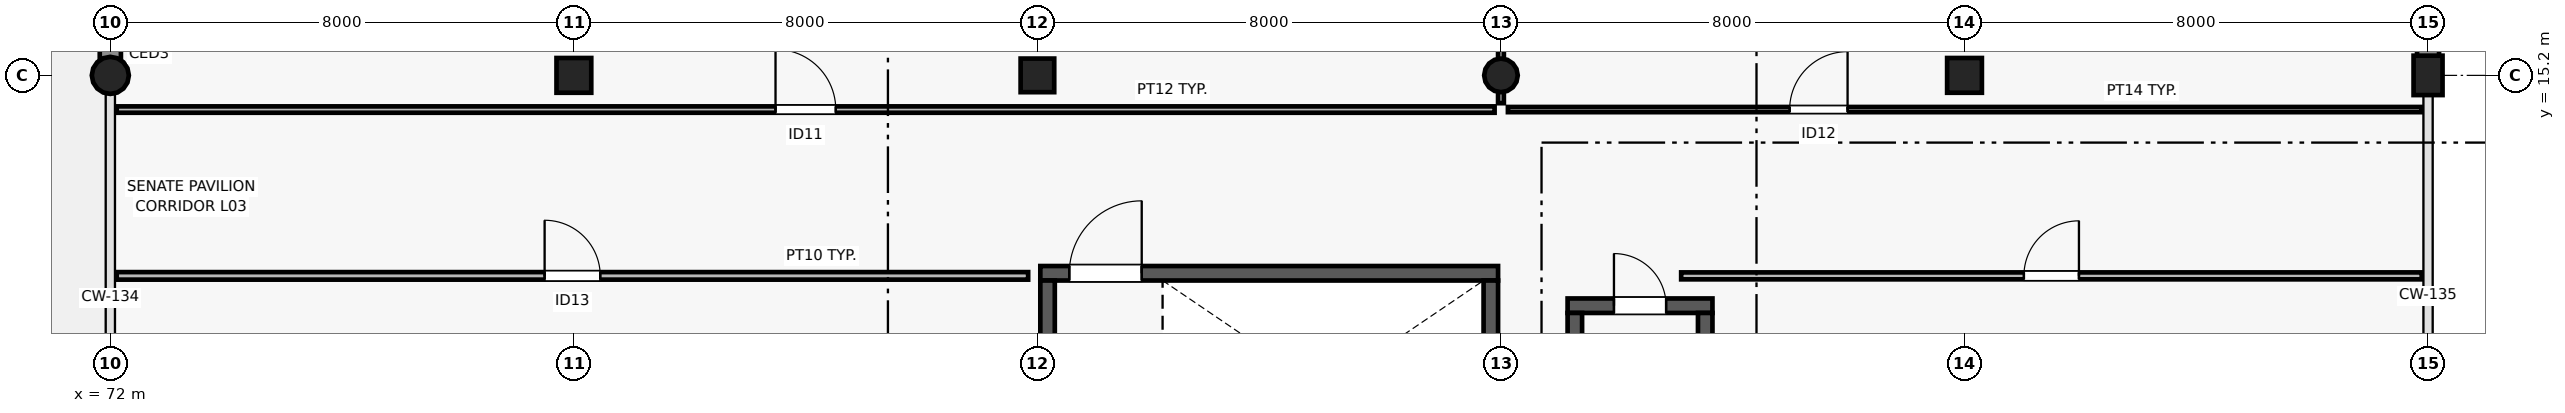
"""IFC4 building model, lengths in metres.
Left out: names, types, materials, properties, quantities, classifications, styles, units other than length and angle.
Written with IfcOpenShell. Run it as: python <this file> out.ifc"""

import sys

from ifc_helpers import new_model, si_unit, direction, frame, frame_2d, origin, origin_2d, place, context, subcontext, project, spatial, rectangle, circle, extrude, element, fill, save


model = new_model("IFC4")
c1 = context("Model", 3, precision=1e-05, world=origin(), true_north=direction((0.0, 1.0)))
c2 = subcontext(c1, "Body", "Model", "MODEL_VIEW")
j1 = project(units=[si_unit("LENGTHUNIT", "METRE"), si_unit("PLANEANGLEUNIT", "RADIAN")], contexts=[c1])
p1 = place(None, origin())
s1 = spatial("IfcSite", under=j1, at=p1, CompositionType="ELEMENT")
p2 = place(p1, origin())
s2 = spatial("IfcBuilding", under=s1, at=p2, CompositionType="ELEMENT")
p3 = place(p2, frame((0.0, 0.0, 13.2)))
s3 = spatial("IfcBuildingStorey", under=s2, at=p3, CompositionType="ELEMENT", Elevation=13.2)
p4 = place(p3, frame((72.0, 15.2, 0.0), z_axis=(0.0, 0.0, 1.0), x_axis=(1.0, 0.0, 0.0)))
e1 = element("IfcColumn", 1, at=p4, inside=s3, PredefinedType="COLUMN", context=c2, shape_type="SweptSolid", body=[
    extrude(circle(Radius=0.32, at=origin_2d()), origin(), (0.0, 0.0, 1.0), 4.2),
])
p5 = place(p3, frame((80.0, 15.2, 0.0), z_axis=(0.0, 0.0, 1.0), x_axis=(1.0, 0.0, 0.0)))
e2 = element("IfcColumn", 2, at=p5, inside=s3, PredefinedType="COLUMN", context=c2, shape_type="SweptSolid", body=[
    extrude(rectangle(XDim=0.6, YDim=0.6, at=origin_2d()), origin(), (0.0, 0.0, 1.0), 4.2),
])
p6 = place(p3, frame((88.0, 15.2, 0.0), z_axis=(0.0, 0.0, 1.0), x_axis=(1.0, 0.0, 0.0)))
e3 = element("IfcColumn", 3, at=p6, inside=s3, PredefinedType="COLUMN", context=c2, shape_type="SweptSolid", body=[
    extrude(rectangle(XDim=0.58, YDim=0.58, at=origin_2d()), origin(), (0.0, 0.0, 1.0), 4.2),
])
p7 = place(p3, frame((96.0, 15.2, 0.0), z_axis=(0.0, 0.0, 1.0), x_axis=(1.0, 0.0, 0.0)))
e4 = element("IfcColumn", 4, at=p7, inside=s3, PredefinedType="COLUMN", context=c2, shape_type="SweptSolid", body=[
    extrude(circle(Radius=0.29, at=origin_2d()), origin(), (0.0, 0.0, 1.0), 4.2),
])
p8 = place(p3, frame((104.0, 15.2, 0.0), z_axis=(0.0, 0.0, 1.0), x_axis=(1.0, 0.0, 0.0)))
e5 = element("IfcColumn", 5, at=p8, inside=s3, PredefinedType="COLUMN", context=c2, shape_type="SweptSolid", body=[
    extrude(rectangle(XDim=0.6, YDim=0.6, at=origin_2d()), origin(), (0.0, 0.0, 1.0), 4.2),
])
p9 = place(p3, frame((112.0, 15.2, 0.0), z_axis=(0.0, 0.0, 1.0), x_axis=(1.0, 0.0, 0.0)))
e6 = element("IfcColumn", 6, at=p9, inside=s3, PredefinedType="COLUMN", context=c2, shape_type="SweptSolid", body=[
    extrude(rectangle(XDim=0.68, YDim=0.5, at=origin_2d()), origin(), (0.0, 0.0, 1.0), 4.2),
])
p10 = place(p3, frame((72.0, 22.555, 0.0), z_axis=(0.0, 0.0, 1.0), x_axis=(0.0, -1.0, 0.0)))
e7 = element("IfcWall", 7, at=p10, inside=s3, PredefinedType="SOLIDWALL", context=c2, shape_type="SweptSolid", body=[
    extrude(rectangle(XDim=7.086, YDim=0.365, at=frame_2d((3.543, 0.0))), origin(), (0.0, 0.0, 1.0), 3.5),
])
p11 = place(p10, frame((1.669, 0.0, 0.9)))
e8 = element("IfcOpeningElement", 8, at=p11, cuts=e7, PredefinedType="OPENING", context=c2, shape_type="SweptSolid", body=[
    extrude(rectangle(XDim=1.2, YDim=1.5, at=frame_2d((0.6, 0.75))), frame((0.0, 0.192, 0.0), z_axis=(0.0, -1.0, 0.0), x_axis=(1.0, 0.0, 0.0)), (0.0, 0.0, 1.0), 0.385),
])
p12 = place(p10, frame((4.217, 0.0, 0.9)))
e9 = element("IfcOpeningElement", 9, at=p12, cuts=e7, PredefinedType="OPENING", context=c2, shape_type="SweptSolid", body=[
    extrude(rectangle(XDim=1.2, YDim=1.5, at=frame_2d((0.6, 0.75))), frame((0.0, 0.192, 0.0), z_axis=(0.0, -1.0, 0.0), x_axis=(1.0, 0.0, 0.0)), (0.0, 0.0, 1.0), 0.385),
])
p13 = place(p3, frame((112.0, 15.445, 0.0), z_axis=(0.0, 0.0, 1.0), x_axis=(0.0, 1.0, 0.0)))
e10 = element("IfcWall", 10, at=p13, inside=s3, PredefinedType="SOLIDWALL", context=c2, shape_type="SweptSolid", body=[
    extrude(rectangle(XDim=7.086, YDim=0.38, at=frame_2d((3.543, 0.0))), origin(), (0.0, 0.0, 1.0), 3.38),
])
p14 = place(p13, frame((0.869, 0.0, 0.9)))
e11 = element("IfcOpeningElement", 11, at=p14, cuts=e10, PredefinedType="OPENING", context=c2, shape_type="SweptSolid", body=[
    extrude(rectangle(XDim=2.4, YDim=1.8, at=frame_2d((1.2, 0.9))), frame((0.0, 0.2, 0.0), z_axis=(0.0, -1.0, 0.0), x_axis=(1.0, 0.0, 0.0)), (0.0, 0.0, 1.0), 0.4),
])
p15 = place(p13, frame((3.817, 0.0, 0.9)))
e12 = element("IfcOpeningElement", 12, at=p15, cuts=e10, PredefinedType="OPENING", context=c2, shape_type="SweptSolid", body=[
    extrude(rectangle(XDim=2.4, YDim=1.8, at=frame_2d((1.2, 0.9))), frame((0.0, 0.2, 0.0), z_axis=(0.0, -1.0, 0.0), x_axis=(1.0, 0.0, 0.0)), (0.0, 0.0, 1.0), 0.4),
])
p16 = place(p3, frame((88.05, 11.785, 0.0), z_axis=(0.0, 0.0, 1.0), x_axis=(1.0, 0.0, 0.0)))
e13 = element("IfcWall", 13, at=p16, inside=s3, PredefinedType="SHEAR", context=c2, shape_type="SweptSolid", body=[
    extrude(rectangle(XDim=7.9, YDim=0.25, at=frame_2d((3.95, 0.0))), origin(), (0.0, 0.0, 1.0), 3.92),
])
p17 = place(p16, frame((0.5, 0.0, 0.0)))
e14 = element("IfcOpeningElement", 14, at=p17, cuts=e13, PredefinedType="OPENING", context=c2, shape_type="SweptSolid", body=[
    extrude(rectangle(XDim=1.25, YDim=2.2, at=frame_2d((0.625, 1.1))), frame((0.0, 0.135, 0.0), z_axis=(0.0, -1.0, 0.0), x_axis=(1.0, 0.0, 0.0)), (0.0, 0.0, 1.0), 0.27),
])
for number, where, z_axis, x_axis in (
    (15, (88.175, 7.9, 0.0), (0.0, 0.0, 1.0), (0.0, 1.0, 0.0)),
    (16, (95.825, 7.9, 0.0), (0.0, 0.0, 1.0), (0.0, 1.0, 0.0)),
):
    element("IfcWall", number, at=place(p3, frame(where, z_axis=z_axis, x_axis=x_axis)), inside=s3, PredefinedType="SHEAR", context=c2, shape_type="SweptSolid", body=[
        extrude(rectangle(XDim=3.76, YDim=0.25, at=frame_2d((1.88, 0.0))), origin(), (0.0, 0.0, 1.0), 3.92),
    ])
p18 = place(p3, frame((97.15, 11.225, 0.0), z_axis=(0.0, 0.0, 1.0), x_axis=(1.0, 0.0, 0.0)))
e17 = element("IfcWall", 17, at=p18, inside=s3, PredefinedType="SHEAR", context=c2, shape_type="SweptSolid", body=[
    extrude(rectangle(XDim=2.5, YDim=0.25, at=frame_2d((1.25, 0.0))), origin(), (0.0, 0.0, 1.0), 3.92),
])
p19 = place(p18, frame((0.8, 0.0, 0.0)))
e18 = element("IfcOpeningElement", 18, at=p19, cuts=e17, PredefinedType="OPENING", context=c2, shape_type="SweptSolid", body=[
    extrude(rectangle(XDim=0.9, YDim=2.05, at=frame_2d((0.45, 1.025))), frame((0.0, 0.135, 0.0), z_axis=(0.0, -1.0, 0.0), x_axis=(1.0, 0.0, 0.0)), (0.0, 0.0, 1.0), 0.27),
])
for number, where, z_axis, x_axis in (
    (19, (97.275, 8.2, 0.0), (0.0, 0.0, 1.0), (0.0, 1.0, 0.0)),
    (20, (99.525, 8.2, 0.0), (0.0, 0.0, 1.0), (0.0, 1.0, 0.0)),
):
    element("IfcWall", number, at=place(p3, frame(where, z_axis=z_axis, x_axis=x_axis)), inside=s3, PredefinedType="SHEAR", context=c2, shape_type="SweptSolid", body=[
        extrude(rectangle(XDim=2.9, YDim=0.25, at=frame_2d((1.45, 0.0))), origin(), (0.0, 0.0, 1.0), 3.92),
    ])
p20 = place(p3, frame((72.11, 11.74, 0.0), z_axis=(0.0, 0.0, 1.0), x_axis=(1.0, 0.0, 0.0)))
e21 = element("IfcWall", 21, at=p20, inside=s3, PredefinedType="PARTITIONING", context=c2, shape_type="SweptSolid", body=[
    extrude(rectangle(XDim=15.73, YDim=0.13, at=frame_2d((7.865, 0.0))), origin(), (0.0, 0.0, 1.0), 3.9),
])
p21 = place(p20, frame((7.385, 0.0, 0.0)))
e22 = element("IfcOpeningElement", 22, at=p21, cuts=e21, PredefinedType="OPENING", context=c2, shape_type="SweptSolid", body=[
    extrude(rectangle(XDim=0.96, YDim=2.15, at=frame_2d((0.48, 1.075))), frame((0.0, 0.075, 0.0), z_axis=(0.0, -1.0, 0.0), x_axis=(1.0, 0.0, 0.0)), (0.0, 0.0, 1.0), 0.15),
])
p22 = place(p3, frame((99.11, 11.74, 0.0), z_axis=(0.0, 0.0, 1.0), x_axis=(1.0, 0.0, 0.0)))
e23 = element("IfcWall", 23, at=p22, inside=s3, PredefinedType="PARTITIONING", context=c2, shape_type="SweptSolid", body=[
    extrude(rectangle(XDim=12.78, YDim=0.12, at=frame_2d((6.39, 0.0))), origin(), (0.0, 0.0, 1.0), 3.9),
])
p23 = place(p22, frame((5.915, 0.0, 0.0)))
e24 = element("IfcOpeningElement", 24, at=p23, cuts=e23, PredefinedType="OPENING", context=c2, shape_type="SweptSolid", body=[
    extrude(rectangle(XDim=0.95, YDim=2.1, at=frame_2d((0.475, 1.05))), frame((0.0, 0.07, 0.0), z_axis=(0.0, -1.0, 0.0), x_axis=(1.0, 0.0, 0.0)), (0.0, 0.0, 1.0), 0.14),
])
p24 = place(p3, frame((72.11, 14.61, 0.0), z_axis=(0.0, 0.0, 1.0), x_axis=(1.0, 0.0, 0.0)))
e25 = element("IfcWall", 25, at=p24, inside=s3, PredefinedType="PARTITIONING", context=c2, shape_type="SweptSolid", body=[
    extrude(rectangle(XDim=23.78, YDim=0.11, at=frame_2d((11.89, 0.0))), origin(), (0.0, 0.0, 1.0), 3.9),
])
p25 = place(p24, frame((11.37, 0.0, 0.0)))
e26 = element("IfcOpeningElement", 26, at=p25, cuts=e25, PredefinedType="OPENING", context=c2, shape_type="SweptSolid", body=[
    extrude(rectangle(XDim=1.04, YDim=2.15, at=frame_2d((0.52, 1.075))), frame((0.0, 0.065, 0.0), z_axis=(0.0, -1.0, 0.0), x_axis=(1.0, 0.0, 0.0)), (0.0, 0.0, 1.0), 0.13),
])
p26 = place(p3, frame((96.0, 14.72, 0.0), z_axis=(0.0, 0.0, 1.0), x_axis=(0.0, 1.0, 0.0)))
e27 = element("IfcWall", 27, at=p26, inside=s3, PredefinedType="PARTITIONING", context=c2, shape_type="SweptSolid", body=[
    extrude(rectangle(XDim=7.7, YDim=0.1, at=frame_2d((3.85, 0.0))), origin(), (0.0, 0.0, 1.0), 3.38),
])
p27 = place(p3, frame((96.12, 14.61, 0.0), z_axis=(0.0, 0.0, 1.0), x_axis=(1.0, 0.0, 0.0)))
e28 = element("IfcWall", 28, at=p27, inside=s3, PredefinedType="PARTITIONING", context=c2, shape_type="SweptSolid", body=[
    extrude(rectangle(XDim=15.77, YDim=0.09, at=frame_2d((7.885, 0.0))), origin(), (0.0, 0.0, 1.0), 3.9),
])
p28 = place(p27, frame((4.862, 0.0, 0.0)))
e29 = element("IfcOpeningElement", 29, at=p28, cuts=e28, PredefinedType="OPENING", context=c2, shape_type="SweptSolid", body=[
    extrude(rectangle(XDim=1.0, YDim=2.15, at=frame_2d((0.5, 1.075))), frame((0.0, 0.055, 0.0), z_axis=(0.0, -1.0, 0.0), x_axis=(1.0, 0.0, 0.0)), (0.0, 0.0, 1.0), 0.11),
])
p29 = place(p17, origin())
e30 = element("IfcDoor", 30, at=p29, inside=s3, OperationType="SINGLE_SWING_RIGHT", PredefinedType="DOOR", context=c2, shape_type="SweptSolid", body=[
    extrude(rectangle(XDim=1.25, YDim=2.2, at=frame_2d((0.625, 1.1))), frame((0.0, 0.025, 0.0), z_axis=(0.0, -1.0, 0.0), x_axis=(1.0, 0.0, 0.0)), (0.0, 0.0, 1.0), 0.05),
])
fill(e14, e30)
p30 = place(p19, origin())
e31 = element("IfcDoor", 31, at=p30, inside=s3, OperationType="SINGLE_SWING_LEFT", PredefinedType="DOOR", context=c2, shape_type="SweptSolid", body=[
    extrude(rectangle(XDim=0.9, YDim=2.05, at=frame_2d((0.45, 1.025))), frame((0.0, 0.025, 0.0), z_axis=(0.0, -1.0, 0.0), x_axis=(1.0, 0.0, 0.0)), (0.0, 0.0, 1.0), 0.05),
])
fill(e18, e31)
p31 = place(p21, origin())
e32 = element("IfcDoor", 32, at=p31, inside=s3, OperationType="SINGLE_SWING_LEFT", PredefinedType="DOOR", context=c2, shape_type="SweptSolid", body=[
    extrude(rectangle(XDim=0.96, YDim=2.15, at=frame_2d((0.48, 1.075))), frame((0.0, 0.025, 0.0), z_axis=(0.0, -1.0, 0.0), x_axis=(1.0, 0.0, 0.0)), (0.0, 0.0, 1.0), 0.05),
])
fill(e22, e32)
p32 = place(p23, origin())
e33 = element("IfcDoor", 33, at=p32, inside=s3, OperationType="SINGLE_SWING_RIGHT", PredefinedType="DOOR", context=c2, shape_type="SweptSolid", body=[
    extrude(rectangle(XDim=0.95, YDim=2.1, at=frame_2d((0.475, 1.05))), frame((0.0, 0.025, 0.0), z_axis=(0.0, -1.0, 0.0), x_axis=(1.0, 0.0, 0.0)), (0.0, 0.0, 1.0), 0.05),
])
fill(e24, e33)
p33 = place(p25, origin())
e34 = element("IfcDoor", 34, at=p33, inside=s3, OperationType="SINGLE_SWING_LEFT", PredefinedType="DOOR", context=c2, shape_type="SweptSolid", body=[
    extrude(rectangle(XDim=1.04, YDim=2.15, at=frame_2d((0.52, 1.075))), frame((0.0, 0.025, 0.0), z_axis=(0.0, -1.0, 0.0), x_axis=(1.0, 0.0, 0.0)), (0.0, 0.0, 1.0), 0.05),
])
fill(e26, e34)
p34 = place(p28, origin())
e35 = element("IfcDoor", 35, at=p34, inside=s3, OperationType="SINGLE_SWING_RIGHT", PredefinedType="DOOR", context=c2, shape_type="SweptSolid", body=[
    extrude(rectangle(XDim=1.0, YDim=2.15, at=frame_2d((0.5, 1.075))), frame((0.0, 0.025, 0.0), z_axis=(0.0, -1.0, 0.0), x_axis=(1.0, 0.0, 0.0)), (0.0, 0.0, 1.0), 0.05),
])
fill(e29, e35)
save(model, sys.argv[1])
